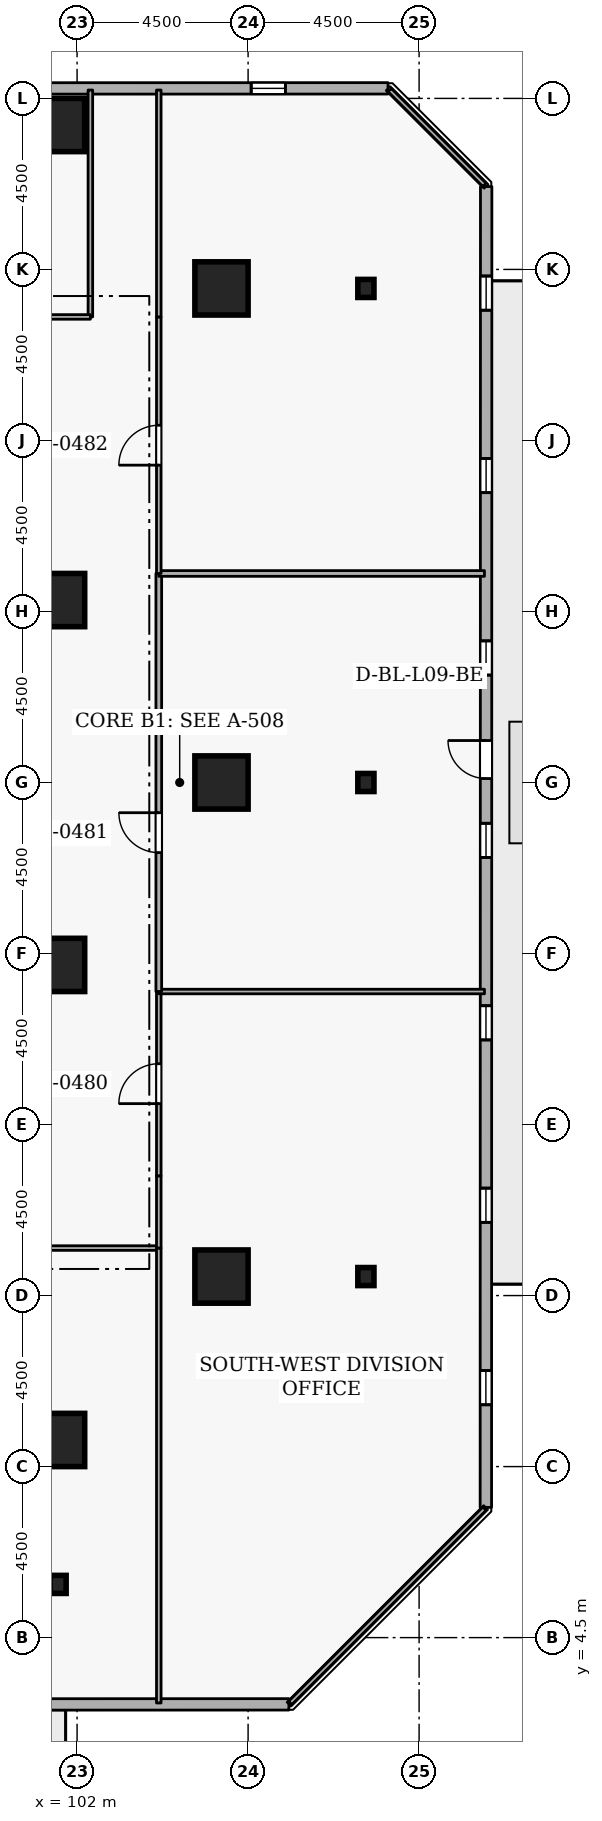
"""IFC4 building model, lengths in metres.
Left out: names, types, materials, properties, quantities, classifications, styles, units other than length and angle.
Written with IfcOpenShell. Run it as: python <this file> out.ifc"""

import sys

from ifc_helpers import new_model, si_unit, direction, frame, frame_2d, origin, origin_2d, place, context, subcontext, project, spatial, rectangle, i_section, extrude, element, fill, save


model = new_model("IFC4")
c1 = context("Model", 3, precision=1e-05, world=origin(), true_north=direction((0.0, 1.0)))
c2 = subcontext(c1, "Body", "Model", "MODEL_VIEW")
j1 = project(units=[si_unit("LENGTHUNIT", "METRE"), si_unit("PLANEANGLEUNIT", "RADIAN")], contexts=[c1])
p1 = place(None, origin())
s1 = spatial("IfcSite", under=j1, at=p1, CompositionType="ELEMENT")
p2 = place(p1, origin())
s2 = spatial("IfcBuilding", under=s1, at=p2, CompositionType="ELEMENT")
p3 = place(p2, frame((0.0, 0.0, 38.7)))
s3 = spatial("IfcBuildingStorey", under=s2, at=p3, CompositionType="ELEMENT", Elevation=38.7)
for number, where, z_axis, x_axis in (
    (1, (105.8, 14.0, 0.0), (0.0, 0.0, 1.0), (1.0, 0.0, 0.0)),
    (2, (105.8, 27.0, 0.0), (0.0, 0.0, 1.0), (1.0, 0.0, 0.0)),
    (3, (105.8, 40.0, 0.0), (0.0, 0.0, 1.0), (1.0, 0.0, 0.0)),
    (4, (101.5, 44.3, 0.0), (0.0, 0.0, 1.0), (1.0, 0.0, 0.0)),
    (5, (101.5, 9.7, 0.0), (0.0, 0.0, 1.0), (1.0, 0.0, 0.0)),
    (6, (101.5, 22.2, 0.0), (0.0, 0.0, 1.0), (1.0, 0.0, 0.0)),
    (7, (101.5, 31.8, 0.0), (0.0, 0.0, 1.0), (1.0, 0.0, 0.0)),
):
    element("IfcColumn", number, at=place(p3, frame(where, z_axis=z_axis, x_axis=x_axis)), inside=s3, PredefinedType="COLUMN", context=c2, shape_type="SweptSolid", body=[
        extrude(rectangle(XDim=1.4, YDim=1.4, at=origin_2d()), origin(), (0.0, 0.0, 1.0), 3.6),
    ])
for number, where, z_axis, x_axis in (
    (8, (109.6, 14.0, 0.0), (0.0, 0.0, 1.0), (1.0, 0.0, 0.0)),
    (9, (109.6, 27.0, 0.0), (0.0, 0.0, 1.0), (1.0, 0.0, 0.0)),
    (10, (109.6, 40.0, 0.0), (0.0, 0.0, 1.0), (1.0, 0.0, 0.0)),
    (11, (101.5, 5.9, 0.0), (0.0, 0.0, 1.0), (1.0, 0.0, 0.0)),
):
    element("IfcColumn", number, at=place(p3, frame(where, z_axis=z_axis, x_axis=x_axis)), inside=s3, PredefinedType="COLUMN", context=c2, shape_type="SweptSolid", body=[
        extrude(i_section(OverallWidth=0.424, OverallDepth=0.475, WebThickness=0.048, FlangeThickness=0.077, FilletRadius=0.015, at=origin_2d()), origin(), (0.0, 0.0, 1.0), 3.6),
    ])
p4 = place(p3, frame((72.819, 2.735, 0.0), z_axis=(0.0, 0.0, 1.0), x_axis=(0.999999969775, 0.000245864205, 0.0)))
e12 = element("IfcWall", 12, at=p4, inside=s3, PredefinedType="STANDARD", context=c2, shape_type="SweptSolid", body=[
    extrude(rectangle(XDim=34.755, YDim=0.3, at=frame_2d((17.377, 0.0))), origin(), (0.0, 0.0, 1.0), 2.7),
])
p5 = place(p4, frame((19.177, 0.0, 0.0)))
e13 = element("IfcOpeningElement", 13, at=p5, cuts=e12, PredefinedType="OPENING", context=c2, shape_type="SweptSolid", body=[
    extrude(rectangle(XDim=1.0, YDim=2.08, at=frame_2d((0.5, 1.04))), frame((0.0, 0.16, 0.0), z_axis=(0.0, -1.0, 0.0), x_axis=(1.0, 0.0, 0.0)), (0.0, 0.0, 1.0), 0.32),
])
p6 = place(p4, frame((2.7, 0.0, 0.72)))
e14 = element("IfcOpeningElement", 14, at=p6, cuts=e12, PredefinedType="OPENING", context=c2, shape_type="SweptSolid", body=[
    extrude(rectangle(XDim=0.9, YDim=1.75, at=frame_2d((0.45, 0.875))), frame((0.0, 0.16, 0.0), z_axis=(0.0, -1.0, 0.0), x_axis=(1.0, 0.0, 0.0)), (0.0, 0.0, 1.0), 0.32),
])
p7 = place(p4, frame((7.5, 0.0, 0.72)))
e15 = element("IfcOpeningElement", 15, at=p7, cuts=e12, PredefinedType="OPENING", context=c2, shape_type="SweptSolid", body=[
    extrude(rectangle(XDim=0.9, YDim=1.75, at=frame_2d((0.45, 0.875))), frame((0.0, 0.16, 0.0), z_axis=(0.0, -1.0, 0.0), x_axis=(1.0, 0.0, 0.0)), (0.0, 0.0, 1.0), 0.32),
])
p8 = place(p4, frame((17.1, 0.0, 0.72)))
e16 = element("IfcOpeningElement", 16, at=p8, cuts=e12, PredefinedType="OPENING", context=c2, shape_type="SweptSolid", body=[
    extrude(rectangle(XDim=0.9, YDim=1.75, at=frame_2d((0.45, 0.875))), frame((0.0, 0.16, 0.0), z_axis=(0.0, -1.0, 0.0), x_axis=(1.0, 0.0, 0.0)), (0.0, 0.0, 1.0), 0.32),
])
p9 = place(p4, frame((21.9, 0.0, 0.72)))
e17 = element("IfcOpeningElement", 17, at=p9, cuts=e12, PredefinedType="OPENING", context=c2, shape_type="SweptSolid", body=[
    extrude(rectangle(XDim=0.9, YDim=1.75, at=frame_2d((0.45, 0.875))), frame((0.0, 0.16, 0.0), z_axis=(0.0, -1.0, 0.0), x_axis=(1.0, 0.0, 0.0)), (0.0, 0.0, 1.0), 0.32),
])
p10 = place(p4, frame((26.7, 0.0, 0.72)))
e18 = element("IfcOpeningElement", 18, at=p10, cuts=e12, PredefinedType="OPENING", context=c2, shape_type="SweptSolid", body=[
    extrude(rectangle(XDim=0.9, YDim=1.75, at=frame_2d((0.45, 0.875))), frame((0.0, 0.16, 0.0), z_axis=(0.0, -1.0, 0.0), x_axis=(1.0, 0.0, 0.0)), (0.0, 0.0, 1.0), 0.32),
])
p11 = place(p3, frame((112.756, 7.927, 0.0), z_axis=(0.0, 0.0, 1.0), x_axis=(0.000245864205, 0.999999969775, 0.0)))
e19 = element("IfcWall", 19, at=p11, inside=s3, PredefinedType="STANDARD", context=c2, shape_type="SweptSolid", body=[
    extrude(rectangle(XDim=34.755, YDim=0.3, at=frame_2d((17.377, 0.0))), origin(), (0.0, 0.0, 1.0), 2.7),
])
p12 = place(p11, frame((19.177, 0.0, 0.0)))
e20 = element("IfcOpeningElement", 20, at=p12, cuts=e19, PredefinedType="OPENING", context=c2, shape_type="SweptSolid", body=[
    extrude(rectangle(XDim=1.0, YDim=2.08, at=frame_2d((0.5, 1.04))), frame((0.0, 0.16, 0.0), z_axis=(0.0, -1.0, 0.0), x_axis=(1.0, 0.0, 0.0)), (0.0, 0.0, 1.0), 0.32),
])
p13 = place(p11, frame((2.7, 0.0, 0.72)))
e21 = element("IfcOpeningElement", 21, at=p13, cuts=e19, PredefinedType="OPENING", context=c2, shape_type="SweptSolid", body=[
    extrude(rectangle(XDim=0.9, YDim=1.75, at=frame_2d((0.45, 0.875))), frame((0.0, 0.16, 0.0), z_axis=(0.0, -1.0, 0.0), x_axis=(1.0, 0.0, 0.0)), (0.0, 0.0, 1.0), 0.32),
])
p14 = place(p11, frame((7.5, 0.0, 0.72)))
e22 = element("IfcOpeningElement", 22, at=p14, cuts=e19, PredefinedType="OPENING", context=c2, shape_type="SweptSolid", body=[
    extrude(rectangle(XDim=0.9, YDim=1.75, at=frame_2d((0.45, 0.875))), frame((0.0, 0.16, 0.0), z_axis=(0.0, -1.0, 0.0), x_axis=(1.0, 0.0, 0.0)), (0.0, 0.0, 1.0), 0.32),
])
p15 = place(p11, frame((12.3, 0.0, 0.72)))
e23 = element("IfcOpeningElement", 23, at=p15, cuts=e19, PredefinedType="OPENING", context=c2, shape_type="SweptSolid", body=[
    extrude(rectangle(XDim=0.9, YDim=1.75, at=frame_2d((0.45, 0.875))), frame((0.0, 0.16, 0.0), z_axis=(0.0, -1.0, 0.0), x_axis=(1.0, 0.0, 0.0)), (0.0, 0.0, 1.0), 0.32),
])
p16 = place(p11, frame((17.1, 0.0, 0.72)))
e24 = element("IfcOpeningElement", 24, at=p16, cuts=e19, PredefinedType="OPENING", context=c2, shape_type="SweptSolid", body=[
    extrude(rectangle(XDim=0.9, YDim=1.75, at=frame_2d((0.45, 0.875))), frame((0.0, 0.16, 0.0), z_axis=(0.0, -1.0, 0.0), x_axis=(1.0, 0.0, 0.0)), (0.0, 0.0, 1.0), 0.32),
])
p17 = place(p11, frame((21.9, 0.0, 0.72)))
e25 = element("IfcOpeningElement", 25, at=p17, cuts=e19, PredefinedType="OPENING", context=c2, shape_type="SweptSolid", body=[
    extrude(rectangle(XDim=0.9, YDim=1.75, at=frame_2d((0.45, 0.875))), frame((0.0, 0.16, 0.0), z_axis=(0.0, -1.0, 0.0), x_axis=(1.0, 0.0, 0.0)), (0.0, 0.0, 1.0), 0.32),
])
p18 = place(p11, frame((26.7, 0.0, 0.72)))
e26 = element("IfcOpeningElement", 26, at=p18, cuts=e19, PredefinedType="OPENING", context=c2, shape_type="SweptSolid", body=[
    extrude(rectangle(XDim=0.9, YDim=1.75, at=frame_2d((0.45, 0.875))), frame((0.0, 0.16, 0.0), z_axis=(0.0, -1.0, 0.0), x_axis=(1.0, 0.0, 0.0)), (0.0, 0.0, 1.0), 0.32),
])
p19 = place(p11, frame((31.5, 0.0, 0.72)))
e27 = element("IfcOpeningElement", 27, at=p19, cuts=e19, PredefinedType="OPENING", context=c2, shape_type="SweptSolid", body=[
    extrude(rectangle(XDim=0.9, YDim=1.75, at=frame_2d((0.45, 0.875))), frame((0.0, 0.16, 0.0), z_axis=(0.0, -1.0, 0.0), x_axis=(1.0, 0.0, 0.0)), (0.0, 0.0, 1.0), 0.32),
])
p20 = place(p3, frame((110.181, 45.265, 0.0), z_axis=(0.0, 0.0, 1.0), x_axis=(-0.999999969775, -0.000245864205, 0.0)))
e28 = element("IfcWall", 28, at=p20, inside=s3, PredefinedType="STANDARD", context=c2, shape_type="SweptSolid", body=[
    extrude(rectangle(XDim=34.755, YDim=0.3, at=frame_2d((17.377, 0.0))), origin(), (0.0, 0.0, 1.0), 2.7),
])
p21 = place(p20, frame((2.7, 0.0, 0.72)))
e29 = element("IfcOpeningElement", 29, at=p21, cuts=e28, PredefinedType="OPENING", context=c2, shape_type="SweptSolid", body=[
    extrude(rectangle(XDim=0.9, YDim=1.75, at=frame_2d((0.45, 0.875))), frame((0.0, 0.16, 0.0), z_axis=(0.0, -1.0, 0.0), x_axis=(1.0, 0.0, 0.0)), (0.0, 0.0, 1.0), 0.32),
])
p22 = place(p20, frame((12.3, 0.0, 0.72)))
e30 = element("IfcOpeningElement", 30, at=p22, cuts=e28, PredefinedType="OPENING", context=c2, shape_type="SweptSolid", body=[
    extrude(rectangle(XDim=0.9, YDim=1.75, at=frame_2d((0.45, 0.875))), frame((0.0, 0.16, 0.0), z_axis=(0.0, -1.0, 0.0), x_axis=(1.0, 0.0, 0.0)), (0.0, 0.0, 1.0), 0.32),
])
p23 = place(p20, frame((17.1, 0.0, 0.72)))
e31 = element("IfcOpeningElement", 31, at=p23, cuts=e28, PredefinedType="OPENING", context=c2, shape_type="SweptSolid", body=[
    extrude(rectangle(XDim=0.9, YDim=1.75, at=frame_2d((0.45, 0.875))), frame((0.0, 0.16, 0.0), z_axis=(0.0, -1.0, 0.0), x_axis=(1.0, 0.0, 0.0)), (0.0, 0.0, 1.0), 0.32),
])
p24 = place(p20, frame((26.7, 0.0, 0.72)))
e32 = element("IfcOpeningElement", 32, at=p24, cuts=e28, PredefinedType="OPENING", context=c2, shape_type="SweptSolid", body=[
    extrude(rectangle(XDim=0.9, YDim=1.75, at=frame_2d((0.45, 0.875))), frame((0.0, 0.16, 0.0), z_axis=(0.0, -1.0, 0.0), x_axis=(1.0, 0.0, 0.0)), (0.0, 0.0, 1.0), 0.32),
])
p25 = place(p20, frame((31.5, 0.0, 0.72)))
e33 = element("IfcOpeningElement", 33, at=p25, cuts=e28, PredefinedType="OPENING", context=c2, shape_type="SweptSolid", body=[
    extrude(rectangle(XDim=0.9, YDim=1.75, at=frame_2d((0.45, 0.875))), frame((0.0, 0.16, 0.0), z_axis=(0.0, -1.0, 0.0), x_axis=(1.0, 0.0, 0.0)), (0.0, 0.0, 1.0), 0.32),
])
p26 = place(p3, frame((94.8, 14.75, 0.0), z_axis=(0.0, 0.0, 1.0), x_axis=(1.0, 0.0, 0.0)))
e34 = element("IfcWall", 34, at=p26, inside=s3, PredefinedType="PARTITIONING", context=c2, shape_type="SweptSolid", body=[
    extrude(rectangle(XDim=9.35, YDim=0.12, at=frame_2d((4.675, 0.0))), origin(), (0.0, 0.0, 1.0), 3.34),
])
p27 = place(p26, frame((4.15, 0.0, 0.0)))
e35 = element("IfcOpeningElement", 35, at=p27, cuts=e34, PredefinedType="OPENING", context=c2, shape_type="SweptSolid", body=[
    extrude(rectangle(XDim=1.05, YDim=2.1, at=frame_2d((0.525, 1.05))), frame((0.0, 0.07, 0.0), z_axis=(0.0, -1.0, 0.0), x_axis=(1.0, 0.0, 0.0)), (0.0, 0.0, 1.0), 0.14),
])
p28 = place(p3, frame((104.15, 14.75, 0.0), z_axis=(0.0, 0.0, 1.0), x_axis=(0.0, -1.0, 0.0)))
e36 = element("IfcWall", 36, at=p28, inside=s3, PredefinedType="PARTITIONING", context=c2, shape_type="SweptSolid", body=[
    extrude(rectangle(XDim=11.97, YDim=0.12, at=frame_2d((5.985, 0.0))), origin(), (0.0, 0.0, 1.0), 3.34),
])
p29 = place(p3, frame((102.35, 45.22, 0.0), z_axis=(0.0, 0.0, 1.0), x_axis=(0.0, -1.0, 0.0)))
e37 = element("IfcWall", 37, at=p29, inside=s3, PredefinedType="PARTITIONING", context=c2, shape_type="SweptSolid", body=[
    extrude(rectangle(XDim=5.97, YDim=0.12, at=frame_2d((2.985, 0.0))), origin(), (0.0, 0.0, 1.0), 3.34),
])
p30 = place(p3, frame((102.35, 39.25, 0.0), z_axis=(0.0, 0.0, 1.0), x_axis=(-1.0, 0.0, 0.0)))
e38 = element("IfcWall", 38, at=p30, inside=s3, PredefinedType="PARTITIONING", context=c2, shape_type="SweptSolid", body=[
    extrude(rectangle(XDim=1.862, YDim=0.12, at=frame_2d((0.931, 0.0))), origin(), (0.0, 0.0, 1.0), 3.34),
])
p31 = place(p3, frame((104.15, 14.75, 0.0), z_axis=(0.0, 0.0, 1.0), x_axis=(0.0, 1.0, 0.0)))
e39 = element("IfcWall", 39, at=p31, inside=s3, PredefinedType="PARTITIONING", context=c2, shape_type="SweptSolid", body=[
    extrude(rectangle(XDim=1.9, YDim=0.12, at=frame_2d((0.95, 0.0))), origin(), (0.0, 0.0, 1.0), 3.34),
])
p32 = place(p3, frame((104.15, 16.65, 0.0), z_axis=(0.0, 0.0, 1.0), x_axis=(0.0, 1.0, 0.0)))
e40 = element("IfcWall", 40, at=p32, inside=s3, PredefinedType="PARTITIONING", context=c2, shape_type="SweptSolid", body=[
    extrude(rectangle(XDim=4.85, YDim=0.12, at=frame_2d((2.425, 0.0))), origin(), (0.0, 0.0, 1.0), 3.34),
])
p33 = place(p32, frame((1.9, 0.0, 0.0)))
e41 = element("IfcOpeningElement", 41, at=p33, cuts=e40, PredefinedType="OPENING", context=c2, shape_type="SweptSolid", body=[
    extrude(rectangle(XDim=1.05, YDim=2.1, at=frame_2d((0.525, 1.05))), frame((0.0, 0.07, 0.0), z_axis=(0.0, -1.0, 0.0), x_axis=(1.0, 0.0, 0.0)), (0.0, 0.0, 1.0), 0.14),
])
p34 = place(p3, frame((104.15, 21.5, 0.0), z_axis=(0.0, 0.0, 1.0), x_axis=(1.0, 0.0, 0.0)))
e42 = element("IfcWall", 42, at=p34, inside=s3, PredefinedType="PARTITIONING", context=c2, shape_type="SweptSolid", body=[
    extrude(rectangle(XDim=8.57, YDim=0.12, at=frame_2d((4.285, 0.0))), origin(), (0.0, 0.0, 1.0), 3.34),
])
p35 = place(p3, frame((112.72, 7.893, 0.0), z_axis=(0.0, 0.0, 1.0), x_axis=(-0.707106781187, -0.707106781187, 0.0)))
e43 = element("IfcWall", 43, at=p35, inside=s3, PredefinedType="PARTITIONING", context=c2, shape_type="SweptSolid", body=[
    extrude(rectangle(XDim=7.23, YDim=0.12, at=frame_2d((3.615, 0.0))), origin(), (0.0, 0.0, 1.0), 3.34),
])
p36 = place(p3, frame((104.15, 21.5, 0.0), z_axis=(0.0, 0.0, 1.0), x_axis=(0.0, 1.0, 0.0)))
e44 = element("IfcWall", 44, at=p36, inside=s3, PredefinedType="PARTITIONING", context=c2, shape_type="SweptSolid", body=[
    extrude(rectangle(XDim=11.0, YDim=0.15, at=frame_2d((5.5, 0.0))), origin(), (0.0, 0.0, 1.0), 3.34),
])
p37 = place(p36, frame((3.655, 0.0, 0.0)))
e45 = element("IfcOpeningElement", 45, at=p37, cuts=e44, PredefinedType="OPENING", context=c2, shape_type="SweptSolid", body=[
    extrude(rectangle(XDim=1.05, YDim=2.1, at=frame_2d((0.525, 1.05))), frame((0.0, 0.085, 0.0), z_axis=(0.0, -1.0, 0.0), x_axis=(1.0, 0.0, 0.0)), (0.0, 0.0, 1.0), 0.17),
])
p38 = place(p3, frame((104.15, 32.5, 0.0), z_axis=(0.0, 0.0, 1.0), x_axis=(1.0, 0.0, 0.0)))
e46 = element("IfcWall", 46, at=p38, inside=s3, PredefinedType="PARTITIONING", context=c2, shape_type="SweptSolid", body=[
    extrude(rectangle(XDim=8.57, YDim=0.15, at=frame_2d((4.285, 0.0))), origin(), (0.0, 0.0, 1.0), 3.34),
])
p39 = place(p3, frame((104.15, 32.5, 0.0), z_axis=(0.0, 0.0, 1.0), x_axis=(0.0, 1.0, 0.0)))
e47 = element("IfcWall", 47, at=p39, inside=s3, PredefinedType="PARTITIONING", context=c2, shape_type="SweptSolid", body=[
    extrude(rectangle(XDim=6.75, YDim=0.12, at=frame_2d((3.375, 0.0))), origin(), (0.0, 0.0, 1.0), 3.34),
])
p40 = place(p39, frame((2.85, 0.0, 0.0)))
e48 = element("IfcOpeningElement", 48, at=p40, cuts=e47, PredefinedType="OPENING", context=c2, shape_type="SweptSolid", body=[
    extrude(rectangle(XDim=1.05, YDim=2.1, at=frame_2d((0.525, 1.05))), frame((0.0, 0.07, 0.0), z_axis=(0.0, -1.0, 0.0), x_axis=(1.0, 0.0, 0.0)), (0.0, 0.0, 1.0), 0.14),
])
p41 = place(p3, frame((104.15, 39.25, 0.0), z_axis=(0.0, 0.0, 1.0), x_axis=(0.0, 1.0, 0.0)))
e49 = element("IfcWall", 49, at=p41, inside=s3, PredefinedType="PARTITIONING", context=c2, shape_type="SweptSolid", body=[
    extrude(rectangle(XDim=5.97, YDim=0.12, at=frame_2d((2.985, 0.0))), origin(), (0.0, 0.0, 1.0), 3.34),
])
p42 = place(p3, frame((110.225, 45.22, 0.0), z_axis=(0.0, 0.0, 1.0), x_axis=(0.707106781187, -0.707106781187, 0.0)))
e50 = element("IfcWall", 50, at=p42, inside=s3, PredefinedType="PARTITIONING", context=c2, shape_type="SweptSolid", body=[
    extrude(rectangle(XDim=3.528, YDim=0.12, at=frame_2d((1.764, 0.0))), origin(), (0.0, 0.0, 1.0), 3.34),
])
p43 = place(p12, origin())
e51 = element("IfcDoor", 51, at=p43, inside=s3, OperationType="SINGLE_SWING_RIGHT", PredefinedType="DOOR", context=c2, shape_type="SweptSolid", body=[
    extrude(rectangle(XDim=1.0, YDim=2.08, at=frame_2d((0.5, 1.04))), frame((0.0, 0.025, 0.0), z_axis=(0.0, -1.0, 0.0), x_axis=(1.0, 0.0, 0.0)), (0.0, 0.0, 1.0), 0.05),
])
fill(e20, e51)
p44 = place(p13, origin())
e52 = element("IfcWindow", 52, at=p44, inside=s3, PartitioningType="SINGLE_PANEL", PredefinedType="WINDOW", context=c2, shape_type="SweptSolid", body=[
    extrude(rectangle(XDim=0.9, YDim=1.75, at=frame_2d((0.45, 0.875))), frame((0.0, 0.03, 0.0), z_axis=(0.0, -1.0, 0.0), x_axis=(1.0, 0.0, 0.0)), (0.0, 0.0, 1.0), 0.06),
])
fill(e21, e52)
p45 = place(p14, origin())
e53 = element("IfcWindow", 53, at=p45, inside=s3, PartitioningType="SINGLE_PANEL", PredefinedType="WINDOW", context=c2, shape_type="SweptSolid", body=[
    extrude(rectangle(XDim=0.9, YDim=1.75, at=frame_2d((0.45, 0.875))), frame((0.0, 0.03, 0.0), z_axis=(0.0, -1.0, 0.0), x_axis=(1.0, 0.0, 0.0)), (0.0, 0.0, 1.0), 0.06),
])
fill(e22, e53)
p46 = place(p15, origin())
e54 = element("IfcWindow", 54, at=p46, inside=s3, PartitioningType="SINGLE_PANEL", PredefinedType="WINDOW", context=c2, shape_type="SweptSolid", body=[
    extrude(rectangle(XDim=0.9, YDim=1.75, at=frame_2d((0.45, 0.875))), frame((0.0, 0.03, 0.0), z_axis=(0.0, -1.0, 0.0), x_axis=(1.0, 0.0, 0.0)), (0.0, 0.0, 1.0), 0.06),
])
fill(e23, e54)
p47 = place(p16, origin())
e55 = element("IfcWindow", 55, at=p47, inside=s3, PartitioningType="SINGLE_PANEL", PredefinedType="WINDOW", context=c2, shape_type="SweptSolid", body=[
    extrude(rectangle(XDim=0.9, YDim=1.75, at=frame_2d((0.45, 0.875))), frame((0.0, 0.03, 0.0), z_axis=(0.0, -1.0, 0.0), x_axis=(1.0, 0.0, 0.0)), (0.0, 0.0, 1.0), 0.06),
])
fill(e24, e55)
p48 = place(p17, origin())
e56 = element("IfcWindow", 56, at=p48, inside=s3, PartitioningType="SINGLE_PANEL", PredefinedType="WINDOW", context=c2, shape_type="SweptSolid", body=[
    extrude(rectangle(XDim=0.9, YDim=1.75, at=frame_2d((0.45, 0.875))), frame((0.0, 0.03, 0.0), z_axis=(0.0, -1.0, 0.0), x_axis=(1.0, 0.0, 0.0)), (0.0, 0.0, 1.0), 0.06),
])
fill(e25, e56)
p49 = place(p18, origin())
e57 = element("IfcWindow", 57, at=p49, inside=s3, PartitioningType="SINGLE_PANEL", PredefinedType="WINDOW", context=c2, shape_type="SweptSolid", body=[
    extrude(rectangle(XDim=0.9, YDim=1.75, at=frame_2d((0.45, 0.875))), frame((0.0, 0.03, 0.0), z_axis=(0.0, -1.0, 0.0), x_axis=(1.0, 0.0, 0.0)), (0.0, 0.0, 1.0), 0.06),
])
fill(e26, e57)
p50 = place(p19, origin())
e58 = element("IfcWindow", 58, at=p50, inside=s3, PartitioningType="SINGLE_PANEL", PredefinedType="WINDOW", context=c2, shape_type="SweptSolid", body=[
    extrude(rectangle(XDim=0.9, YDim=1.75, at=frame_2d((0.45, 0.875))), frame((0.0, 0.03, 0.0), z_axis=(0.0, -1.0, 0.0), x_axis=(1.0, 0.0, 0.0)), (0.0, 0.0, 1.0), 0.06),
])
fill(e27, e58)
p51 = place(p21, origin())
e59 = element("IfcWindow", 59, at=p51, inside=s3, PartitioningType="SINGLE_PANEL", PredefinedType="WINDOW", context=c2, shape_type="SweptSolid", body=[
    extrude(rectangle(XDim=0.9, YDim=1.75, at=frame_2d((0.45, 0.875))), frame((0.0, 0.03, 0.0), z_axis=(0.0, -1.0, 0.0), x_axis=(1.0, 0.0, 0.0)), (0.0, 0.0, 1.0), 0.06),
])
fill(e29, e59)
p52 = place(p33, origin())
e60 = element("IfcDoor", 60, at=p52, inside=s3, OperationType="SINGLE_SWING_LEFT", PredefinedType="DOOR", context=c2, shape_type="SweptSolid", body=[
    extrude(rectangle(XDim=1.05, YDim=2.1, at=frame_2d((0.525, 1.05))), frame((0.0, 0.025, 0.0), z_axis=(0.0, -1.0, 0.0), x_axis=(1.0, 0.0, 0.0)), (0.0, 0.0, 1.0), 0.05),
])
fill(e41, e60)
p53 = place(p37, origin())
e61 = element("IfcDoor", 61, at=p53, inside=s3, OperationType="SINGLE_SWING_RIGHT", PredefinedType="DOOR", context=c2, shape_type="SweptSolid", body=[
    extrude(rectangle(XDim=1.05, YDim=2.1, at=frame_2d((0.525, 1.05))), frame((0.0, 0.025, 0.0), z_axis=(0.0, -1.0, 0.0), x_axis=(1.0, 0.0, 0.0)), (0.0, 0.0, 1.0), 0.05),
])
fill(e45, e61)
p54 = place(p40, origin())
e62 = element("IfcDoor", 62, at=p54, inside=s3, OperationType="SINGLE_SWING_LEFT", PredefinedType="DOOR", context=c2, shape_type="SweptSolid", body=[
    extrude(rectangle(XDim=1.05, YDim=2.1, at=frame_2d((0.525, 1.05))), frame((0.0, 0.025, 0.0), z_axis=(0.0, -1.0, 0.0), x_axis=(1.0, 0.0, 0.0)), (0.0, 0.0, 1.0), 0.05),
])
fill(e48, e62)
save(model, sys.argv[1])
